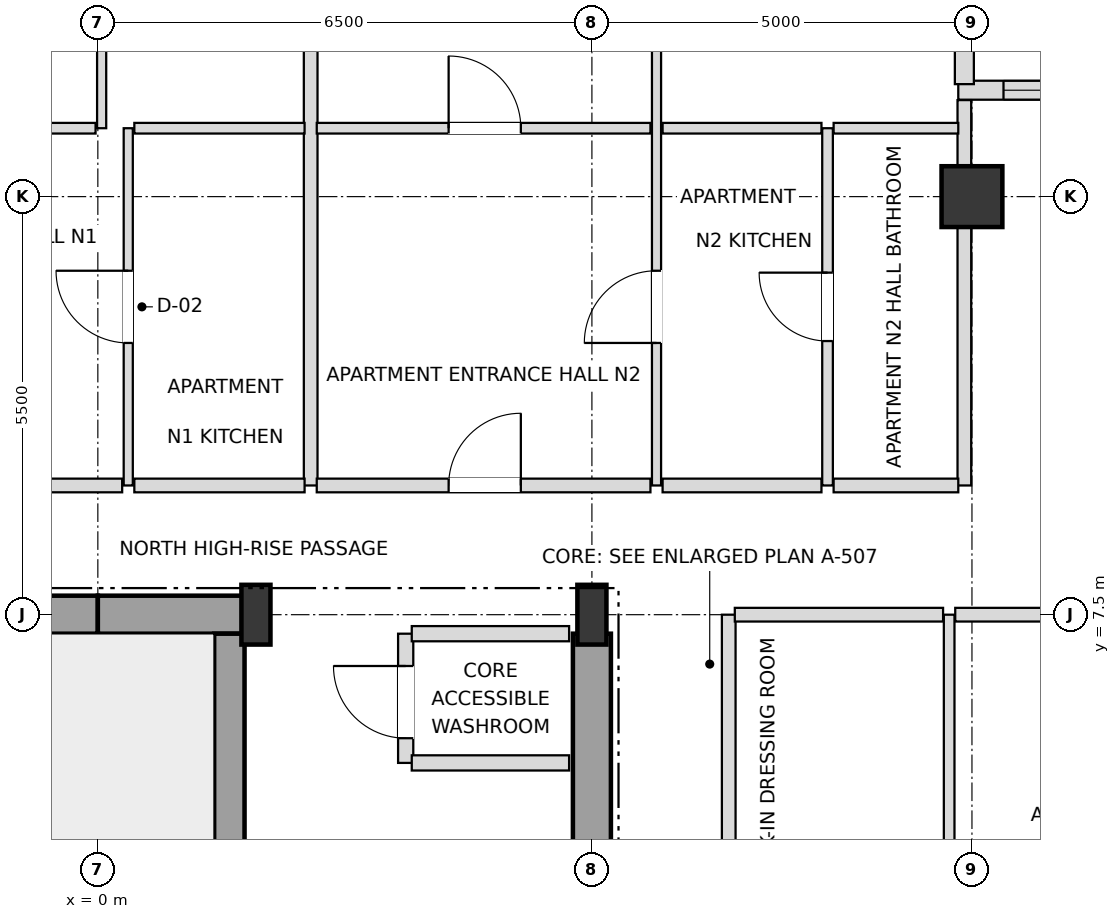
"""IFC4 building model, lengths in metres.
Left out: names, types, materials, properties, quantities, classifications, styles, units other than length and angle.
Written with IfcOpenShell. Run it as: python <this file> out.ifc"""

import sys

from ifc_helpers import new_model, si_unit, direction, frame, frame_2d, origin, origin_2d, place, context, subcontext, project, spatial, rectangle, i_section, extrude, element, fill, save


model = new_model("IFC4")
c1 = context("Model", 3, precision=1e-05, world=origin(), true_north=direction((0.0, 1.0)))
c2 = subcontext(c1, "Body", "Model", "MODEL_VIEW")
j1 = project(units=[si_unit("LENGTHUNIT", "METRE"), si_unit("PLANEANGLEUNIT", "RADIAN")], contexts=[c1])
p1 = place(None, origin())
s1 = spatial("IfcSite", under=j1, at=p1, CompositionType="ELEMENT")
p2 = place(p1, origin())
s2 = spatial("IfcBuilding", under=s1, at=p2, CompositionType="ELEMENT")
p3 = place(p2, frame((0.0, 0.0, 233.1)))
s3 = spatial("IfcBuildingStorey", under=s2, at=p3, CompositionType="ELEMENT", Elevation=233.1)
for number, where, z_axis, x_axis in (
    (1, (2.08, 7.5, 0.0), (0.0, 0.0, 1.0), (1.0, 0.0, 0.0)),
    (2, (6.5, 7.5, 0.0), (0.0, 0.0, 1.0), (1.0, 0.0, 0.0)),
):
    element("IfcColumn", number, at=place(p3, frame(where, z_axis=z_axis, x_axis=x_axis)), inside=s3, PredefinedType="COLUMN", context=c2, shape_type="SweptSolid", body=[
        extrude(i_section(OverallWidth=0.382, OverallDepth=0.786, WebThickness=0.02, FlangeThickness=0.033, at=origin_2d()), origin(), (0.0, 0.0, 1.0), 3.6),
    ])
p4 = place(p3, frame((11.5, 13.0, 0.0), z_axis=(0.0, 0.0, 1.0), x_axis=(1.0, 0.0, 0.0)))
e3 = element("IfcColumn", 3, at=p4, inside=s3, PredefinedType="COLUMN", context=c2, shape_type="SweptSolid", body=[
    extrude(rectangle(XDim=0.8, YDim=0.8, at=origin_2d()), origin(), (0.0, 0.0, 1.0), 3.6),
])
p5 = place(p3, frame((16.98, 14.4, 0.0), z_axis=(0.0, 0.0, 1.0), x_axis=(-1.0, 0.0, 0.0)))
e4 = element("IfcWall", 4, at=p5, inside=s3, PredefinedType="SOLIDWALL", context=c2, shape_type="SweptSolid", body=[
    extrude(rectangle(XDim=5.66, YDim=0.25, at=frame_2d((2.83, 0.0))), origin(), (0.0, 0.0, 1.0), 2.748),
])
p6 = place(p5, frame((0.595, 0.0, 0.72)))
e5 = element("IfcOpeningElement", 5, at=p6, cuts=e4, PredefinedType="OPENING", context=c2, shape_type="SweptSolid", body=[
    extrude(rectangle(XDim=1.8, YDim=1.68, at=frame_2d((0.9, 0.84))), frame((0.0, 0.135, 0.0), z_axis=(0.0, -1.0, 0.0), x_axis=(1.0, 0.0, 0.0)), (0.0, 0.0, 1.0), 0.27),
])
p7 = place(p5, frame((3.265, 0.0, 0.72)))
e6 = element("IfcOpeningElement", 6, at=p7, cuts=e4, PredefinedType="OPENING", context=c2, shape_type="SweptSolid", body=[
    extrude(rectangle(XDim=1.8, YDim=1.68, at=frame_2d((0.9, 0.84))), frame((0.0, 0.135, 0.0), z_axis=(0.0, -1.0, 0.0), x_axis=(1.0, 0.0, 0.0)), (0.0, 0.0, 1.0), 0.27),
])
p8 = place(p3, frame((11.4, 14.48, 0.0), z_axis=(0.0, 0.0, 1.0), x_axis=(0.0, 1.0, 0.0)))
e7 = element("IfcWall", 7, at=p8, inside=s3, PredefinedType="SOLIDWALL", context=c2, shape_type="SweptSolid", body=[
    extrude(rectangle(XDim=5.34, YDim=0.25, at=frame_2d((2.67, 0.0))), origin(), (0.0, 0.0, 1.0), 2.748),
])
p9 = place(p8, frame((1.615, 0.0, 0.72)))
e8 = element("IfcOpeningElement", 8, at=p9, cuts=e7, PredefinedType="OPENING", context=c2, shape_type="SweptSolid", body=[
    extrude(rectangle(XDim=1.8, YDim=1.68, at=frame_2d((0.9, 0.84))), frame((0.0, 0.135, 0.0), z_axis=(0.0, -1.0, 0.0), x_axis=(1.0, 0.0, 0.0)), (0.0, 0.0, 1.0), 0.27),
])
p10 = place(p3, frame((-6.75, 7.5, 0.0), z_axis=(0.0, 0.0, 1.0), x_axis=(1.0, 0.0, 0.0)))
e9 = element("IfcWall", 9, at=p10, inside=s3, PredefinedType="SHEAR", context=c2, shape_type="SweptSolid", body=[
    extrude(rectangle(XDim=6.75, YDim=0.5, at=frame_2d((3.375, 0.0))), origin(), (0.0, 0.0, 1.0), 3.38),
])
p11 = place(p10, frame((1.65, 0.0, 0.0)))
e10 = element("IfcOpeningElement", 10, at=p11, cuts=e9, PredefinedType="OPENING", context=c2, shape_type="SweptSolid", body=[
    extrude(rectangle(XDim=1.05, YDim=2.15, at=frame_2d((0.525, 1.075))), frame((0.0, 0.26, 0.0), z_axis=(0.0, -1.0, 0.0), x_axis=(1.0, 0.0, 0.0)), (0.0, 0.0, 1.0), 0.52),
])
p12 = place(p3, frame((0.0, 7.5, 0.0), z_axis=(0.0, 0.0, 1.0), x_axis=(1.0, 0.0, 0.0)))
e11 = element("IfcWall", 11, at=p12, inside=s3, PredefinedType="SHEAR", context=c2, shape_type="SweptSolid", body=[
    extrude(rectangle(XDim=2.08, YDim=0.5, at=frame_2d((1.04, 0.0))), origin(), (0.0, 0.0, 1.0), 3.38),
])
p13 = place(p3, frame((6.5, 3.95, 0.0), z_axis=(0.0, 0.0, 1.0), x_axis=(0.0, 1.0, 0.0)))
e12 = element("IfcWall", 12, at=p13, inside=s3, PredefinedType="SHEAR", context=c2, shape_type="SweptSolid", body=[
    extrude(rectangle(XDim=3.3, YDim=0.5, at=frame_2d((1.65, 0.0))), origin(), (0.0, 0.0, 1.0), 3.38),
])
p14 = place(p3, frame((1.73, 3.95, 0.0), z_axis=(0.0, 0.0, 1.0), x_axis=(0.0, 1.0, 0.0)))
e13 = element("IfcWall", 13, at=p14, inside=s3, PredefinedType="SHEAR", context=c2, shape_type="SweptSolid", body=[
    extrude(rectangle(XDim=3.3, YDim=0.4, at=frame_2d((1.65, 0.0))), origin(), (0.0, 0.0, 1.0), 3.38),
])
p15 = place(p3, frame((0.05, 13.9, 0.0), z_axis=(0.0, 0.0, 1.0), x_axis=(0.0, 1.0, 0.0)))
e14 = element("IfcWall", 14, at=p15, inside=s3, PredefinedType="PARTITIONING", context=c2, shape_type="SweptSolid", body=[
    extrude(rectangle(XDim=6.0, YDim=0.12, at=frame_2d((3.0, 0.0))), origin(), (0.0, 0.0, 1.0), 3.018),
])
p16 = place(p15, frame((2.55, 0.0, 0.0)))
e15 = element("IfcOpeningElement", 15, at=p16, cuts=e14, PredefinedType="OPENING", context=c2, shape_type="SweptSolid", body=[
    extrude(rectangle(XDim=0.9, YDim=2.1, at=frame_2d((0.45, 1.05))), frame((0.0, 0.07, 0.0), z_axis=(0.0, -1.0, 0.0), x_axis=(1.0, 0.0, 0.0)), (0.0, 0.0, 1.0), 0.14),
])
p17 = place(p3, frame((0.4, 9.2, 0.0), z_axis=(0.0, 0.0, 1.0), x_axis=(0.0, 1.0, 0.0)))
e16 = element("IfcWall", 16, at=p17, inside=s3, PredefinedType="PARTITIONING", context=c2, shape_type="SweptSolid", body=[
    extrude(rectangle(XDim=4.7, YDim=0.12, at=frame_2d((2.35, 0.0))), origin(), (0.0, 0.0, 1.0), 3.38),
])
p18 = place(p17, frame((1.875, 0.0, 0.0)))
e17 = element("IfcOpeningElement", 17, at=p18, cuts=e16, PredefinedType="OPENING", context=c2, shape_type="SweptSolid", body=[
    extrude(rectangle(XDim=0.95, YDim=2.1, at=frame_2d((0.475, 1.05))), frame((0.0, 0.07, 0.0), z_axis=(0.0, -1.0, 0.0), x_axis=(1.0, 0.0, 0.0)), (0.0, 0.0, 1.0), 0.14),
])
p19 = place(p3, frame((2.8, 9.2, 0.0), z_axis=(0.0, 0.0, 1.0), x_axis=(0.0, 1.0, 0.0)))
e18 = element("IfcWall", 18, at=p19, inside=s3, PredefinedType="PARTITIONING", context=c2, shape_type="SweptSolid", body=[
    extrude(rectangle(XDim=10.7, YDim=0.18, at=frame_2d((5.35, 0.0))), origin(), (0.0, 0.0, 1.0), 3.018),
])
p20 = place(p3, frame((4.05, 5.55, 0.0), z_axis=(0.0, 0.0, 1.0), x_axis=(0.0, 1.0, 0.0)))
e19 = element("IfcWall", 19, at=p20, inside=s3, PredefinedType="SOLIDWALL", context=c2, shape_type="SweptSolid", body=[
    extrude(rectangle(XDim=1.7, YDim=0.2, at=frame_2d((0.85, 0.0))), origin(), (0.0, 0.0, 1.0), 3.38),
])
p21 = place(p20, frame((0.325, 0.0, 0.0)))
e20 = element("IfcOpeningElement", 20, at=p21, cuts=e19, PredefinedType="OPENING", context=c2, shape_type="SweptSolid", body=[
    extrude(rectangle(XDim=0.95, YDim=2.15, at=frame_2d((0.475, 1.075))), frame((0.0, 0.11, 0.0), z_axis=(0.0, -1.0, 0.0), x_axis=(1.0, 0.0, 0.0)), (0.0, 0.0, 1.0), 0.22),
])
p22 = place(p3, frame((7.35, 9.2, 0.0), z_axis=(0.0, 0.0, 1.0), x_axis=(0.0, 1.0, 0.0)))
e21 = element("IfcWall", 21, at=p22, inside=s3, PredefinedType="PARTITIONING", context=c2, shape_type="SweptSolid", body=[
    extrude(rectangle(XDim=10.7, YDim=0.12, at=frame_2d((5.35, 0.0))), origin(), (0.0, 0.0, 1.0), 2.826),
])
p23 = place(p22, frame((1.875, 0.0, 0.0)))
e22 = element("IfcOpeningElement", 22, at=p23, cuts=e21, PredefinedType="OPENING", context=c2, shape_type="SweptSolid", body=[
    extrude(rectangle(XDim=0.95, YDim=2.1, at=frame_2d((0.475, 1.05))), frame((0.0, 0.07, 0.0), z_axis=(0.0, -1.0, 0.0), x_axis=(1.0, 0.0, 0.0)), (0.0, 0.0, 1.0), 0.14),
])
p24 = place(p22, frame((7.25, 0.0, 0.0)))
e23 = element("IfcOpeningElement", 23, at=p24, cuts=e21, PredefinedType="OPENING", context=c2, shape_type="SweptSolid", body=[
    extrude(rectangle(XDim=0.9, YDim=2.1, at=frame_2d((0.45, 1.05))), frame((0.0, 0.07, 0.0), z_axis=(0.0, -1.0, 0.0), x_axis=(1.0, 0.0, 0.0)), (0.0, 0.0, 1.0), 0.14),
])
p25 = place(p3, frame((8.3, -7.5, 0.0), z_axis=(0.0, 0.0, 1.0), x_axis=(0.0, 1.0, 0.0)))
e24 = element("IfcWall", 24, at=p25, inside=s3, PredefinedType="PARTITIONING", context=c2, shape_type="SweptSolid", body=[
    extrude(rectangle(XDim=15.0, YDim=0.18, at=frame_2d((7.5, 0.0))), origin(), (0.0, 0.0, 1.0), 3.38),
])
p26 = place(p25, frame((2.355, 0.0, 0.0)))
e25 = element("IfcOpeningElement", 25, at=p26, cuts=e24, PredefinedType="OPENING", context=c2, shape_type="SweptSolid", body=[
    extrude(rectangle(XDim=0.95, YDim=2.15, at=frame_2d((0.475, 1.075))), frame((0.0, 0.1, 0.0), z_axis=(0.0, -1.0, 0.0), x_axis=(1.0, 0.0, 0.0)), (0.0, 0.0, 1.0), 0.2),
])
p27 = place(p3, frame((9.6, 9.2, 0.0), z_axis=(0.0, 0.0, 1.0), x_axis=(0.0, 1.0, 0.0)))
e26 = element("IfcWall", 26, at=p27, inside=s3, PredefinedType="PARTITIONING", context=c2, shape_type="SweptSolid", body=[
    extrude(rectangle(XDim=4.7, YDim=0.14, at=frame_2d((2.35, 0.0))), origin(), (0.0, 0.0, 1.0), 2.826),
])
p28 = place(p27, frame((1.9, 0.0, 0.0)))
e27 = element("IfcOpeningElement", 27, at=p28, cuts=e26, PredefinedType="OPENING", context=c2, shape_type="SweptSolid", body=[
    extrude(rectangle(XDim=0.9, YDim=2.1, at=frame_2d((0.45, 1.05))), frame((0.0, 0.08, 0.0), z_axis=(0.0, -1.0, 0.0), x_axis=(1.0, 0.0, 0.0)), (0.0, 0.0, 1.0), 0.16),
])
p29 = place(p3, frame((11.2, -7.5, 0.0), z_axis=(0.0, 0.0, 1.0), x_axis=(0.0, 1.0, 0.0)))
e28 = element("IfcWall", 28, at=p29, inside=s3, PredefinedType="PARTITIONING", context=c2, shape_type="SweptSolid", body=[
    extrude(rectangle(XDim=15.0, YDim=0.14, at=frame_2d((7.5, 0.0))), origin(), (0.0, 0.0, 1.0), 3.38),
])
p30 = place(p29, frame((3.475, 0.0, 0.0)))
e29 = element("IfcOpeningElement", 29, at=p30, cuts=e28, PredefinedType="OPENING", context=c2, shape_type="SweptSolid", body=[
    extrude(rectangle(XDim=0.95, YDim=2.1, at=frame_2d((0.475, 1.05))), frame((0.0, 0.08, 0.0), z_axis=(0.0, -1.0, 0.0), x_axis=(1.0, 0.0, 0.0)), (0.0, 0.0, 1.0), 0.16),
])
p31 = place(p3, frame((11.4, 9.2, 0.0), z_axis=(0.0, 0.0, 1.0), x_axis=(0.0, 1.0, 0.0)))
e30 = element("IfcWall", 30, at=p31, inside=s3, PredefinedType="PARTITIONING", context=c2, shape_type="SweptSolid", body=[
    extrude(rectangle(XDim=5.07, YDim=0.18, at=frame_2d((2.535, 0.0))), origin(), (0.0, 0.0, 1.0), 2.748),
])
for number, where, z_axis, x_axis in (
    (31, (4.13, 5.55, 0.0), (0.0, 0.0, 1.0), (1.0, 0.0, 0.0)),
    (32, (4.13, 7.25, 0.0), (0.0, 0.0, 1.0), (1.0, 0.0, 0.0)),
):
    element("IfcWall", number, at=place(p3, frame(where, z_axis=z_axis, x_axis=x_axis)), inside=s3, PredefinedType="SOLIDWALL", context=c2, shape_type="SweptSolid", body=[
        extrude(rectangle(XDim=2.07, YDim=0.2, at=frame_2d((1.035, 0.0))), origin(), (0.0, 0.0, 1.0), 3.38),
    ])
p32 = place(p3, frame((8.38, 7.5, 0.0), z_axis=(0.0, 0.0, 1.0), x_axis=(1.0, 0.0, 0.0)))
e33 = element("IfcWall", 33, at=p32, inside=s3, PredefinedType="PARTITIONING", context=c2, shape_type="SweptSolid", body=[
    extrude(rectangle(XDim=2.74, YDim=0.18, at=frame_2d((1.37, 0.0))), origin(), (0.0, 0.0, 1.0), 2.826),
])
p33 = place(p3, frame((11.28, 7.5, 0.0), z_axis=(0.0, 0.0, 1.0), x_axis=(1.0, 0.0, 0.0)))
e34 = element("IfcWall", 34, at=p33, inside=s3, PredefinedType="PARTITIONING", context=c2, shape_type="SweptSolid", body=[
    extrude(rectangle(XDim=5.62, YDim=0.18, at=frame_2d((2.81, 0.0))), origin(), (0.0, 0.0, 1.0), 2.826),
])
p34 = place(p3, frame((-4.62, 9.2, 0.0), z_axis=(0.0, 0.0, 1.0), x_axis=(1.0, 0.0, 0.0)))
e35 = element("IfcWall", 35, at=p34, inside=s3, PredefinedType="PARTITIONING", context=c2, shape_type="SweptSolid", body=[
    extrude(rectangle(XDim=4.94, YDim=0.18, at=frame_2d((2.47, 0.0))), origin(), (0.0, 0.0, 1.0), 3.38),
])
p35 = place(p34, frame((1.995, 0.0, 0.0)))
e36 = element("IfcOpeningElement", 36, at=p35, cuts=e35, PredefinedType="OPENING", context=c2, shape_type="SweptSolid", body=[
    extrude(rectangle(XDim=0.95, YDim=2.15, at=frame_2d((0.475, 1.075))), frame((0.0, 0.1, 0.0), z_axis=(0.0, -1.0, 0.0), x_axis=(1.0, 0.0, 0.0)), (0.0, 0.0, 1.0), 0.2),
])
p36 = place(p3, frame((0.48, 9.2, 0.0), z_axis=(0.0, 0.0, 1.0), x_axis=(1.0, 0.0, 0.0)))
e37 = element("IfcWall", 37, at=p36, inside=s3, PredefinedType="PARTITIONING", context=c2, shape_type="SweptSolid", body=[
    extrude(rectangle(XDim=2.24, YDim=0.18, at=frame_2d((1.12, 0.0))), origin(), (0.0, 0.0, 1.0), 3.38),
])
p37 = place(p3, frame((2.88, 9.2, 0.0), z_axis=(0.0, 0.0, 1.0), x_axis=(1.0, 0.0, 0.0)))
e38 = element("IfcWall", 38, at=p37, inside=s3, PredefinedType="PARTITIONING", context=c2, shape_type="SweptSolid", body=[
    extrude(rectangle(XDim=4.39, YDim=0.18, at=frame_2d((2.195, 0.0))), origin(), (0.0, 0.0, 1.0), 2.826),
])
p38 = place(p37, frame((1.735, 0.0, 0.0)))
e39 = element("IfcOpeningElement", 39, at=p38, cuts=e38, PredefinedType="OPENING", context=c2, shape_type="SweptSolid", body=[
    extrude(rectangle(XDim=0.95, YDim=2.15, at=frame_2d((0.475, 1.075))), frame((0.0, 0.1, 0.0), z_axis=(0.0, -1.0, 0.0), x_axis=(1.0, 0.0, 0.0)), (0.0, 0.0, 1.0), 0.2),
])
p39 = place(p3, frame((7.43, 9.2, 0.0), z_axis=(0.0, 0.0, 1.0), x_axis=(1.0, 0.0, 0.0)))
e40 = element("IfcWall", 40, at=p39, inside=s3, PredefinedType="PARTITIONING", context=c2, shape_type="SweptSolid", body=[
    extrude(rectangle(XDim=2.09, YDim=0.18, at=frame_2d((1.045, 0.0))), origin(), (0.0, 0.0, 1.0), 3.38),
])
p40 = place(p3, frame((9.68, 9.2, 0.0), z_axis=(0.0, 0.0, 1.0), x_axis=(1.0, 0.0, 0.0)))
e41 = element("IfcWall", 41, at=p40, inside=s3, PredefinedType="PARTITIONING", context=c2, shape_type="SweptSolid", body=[
    extrude(rectangle(XDim=1.64, YDim=0.18, at=frame_2d((0.82, 0.0))), origin(), (0.0, 0.0, 1.0), 3.38),
])
p41 = place(p3, frame((-2.67, 13.9, 0.0), z_axis=(0.0, 0.0, 1.0), x_axis=(1.0, 0.0, 0.0)))
e42 = element("IfcWall", 42, at=p41, inside=s3, PredefinedType="PARTITIONING", context=c2, shape_type="SweptSolid", body=[
    extrude(rectangle(XDim=2.64, YDim=0.14, at=frame_2d((1.32, 0.0))), origin(), (0.0, 0.0, 1.0), 3.38),
])
p42 = place(p3, frame((0.48, 13.9, 0.0), z_axis=(0.0, 0.0, 1.0), x_axis=(1.0, 0.0, 0.0)))
e43 = element("IfcWall", 43, at=p42, inside=s3, PredefinedType="PARTITIONING", context=c2, shape_type="SweptSolid", body=[
    extrude(rectangle(XDim=2.24, YDim=0.14, at=frame_2d((1.12, 0.0))), origin(), (0.0, 0.0, 1.0), 3.38),
])
p43 = place(p3, frame((2.88, 13.9, 0.0), z_axis=(0.0, 0.0, 1.0), x_axis=(1.0, 0.0, 0.0)))
e44 = element("IfcWall", 44, at=p43, inside=s3, PredefinedType="PARTITIONING", context=c2, shape_type="SweptSolid", body=[
    extrude(rectangle(XDim=4.39, YDim=0.14, at=frame_2d((2.195, 0.0))), origin(), (0.0, 0.0, 1.0), 2.826),
])
p44 = place(p43, frame((1.735, 0.0, 0.0)))
e45 = element("IfcOpeningElement", 45, at=p44, cuts=e44, PredefinedType="OPENING", context=c2, shape_type="SweptSolid", body=[
    extrude(rectangle(XDim=0.95, YDim=2.1, at=frame_2d((0.475, 1.05))), frame((0.0, 0.08, 0.0), z_axis=(0.0, -1.0, 0.0), x_axis=(1.0, 0.0, 0.0)), (0.0, 0.0, 1.0), 0.16),
])
p45 = place(p3, frame((7.43, 13.9, 0.0), z_axis=(0.0, 0.0, 1.0), x_axis=(1.0, 0.0, 0.0)))
e46 = element("IfcWall", 46, at=p45, inside=s3, PredefinedType="PARTITIONING", context=c2, shape_type="SweptSolid", body=[
    extrude(rectangle(XDim=2.09, YDim=0.14, at=frame_2d((1.045, 0.0))), origin(), (0.0, 0.0, 1.0), 3.38),
])
p46 = place(p3, frame((9.68, 13.9, 0.0), z_axis=(0.0, 0.0, 1.0), x_axis=(1.0, 0.0, 0.0)))
e47 = element("IfcWall", 47, at=p46, inside=s3, PredefinedType="PARTITIONING", context=c2, shape_type="SweptSolid", body=[
    extrude(rectangle(XDim=1.64, YDim=0.14, at=frame_2d((0.82, 0.0))), origin(), (0.0, 0.0, 1.0), 3.38),
])
p47 = place(p7, origin())
e48 = element("IfcWindow", 48, at=p47, inside=s3, PartitioningType="SINGLE_PANEL", PredefinedType="WINDOW", context=c2, shape_type="SweptSolid", body=[
    extrude(rectangle(XDim=1.8, YDim=1.68, at=frame_2d((0.9, 0.84))), frame((0.0, 0.03, 0.0), z_axis=(0.0, -1.0, 0.0), x_axis=(1.0, 0.0, 0.0)), (0.0, 0.0, 1.0), 0.06),
])
fill(e6, e48)
p48 = place(p21, origin())
e49 = element("IfcDoor", 49, at=p48, inside=s3, OperationType="SINGLE_SWING_RIGHT", PredefinedType="DOOR", context=c2, shape_type="SweptSolid", body=[
    extrude(rectangle(XDim=0.95, YDim=2.15, at=frame_2d((0.475, 1.075))), frame((0.0, 0.025, 0.0), z_axis=(0.0, -1.0, 0.0), x_axis=(1.0, 0.0, 0.0)), (0.0, 0.0, 1.0), 0.05),
])
fill(e20, e49)
p49 = place(p18, origin())
e50 = element("IfcDoor", 50, at=p49, inside=s3, OperationType="SINGLE_SWING_RIGHT", PredefinedType="DOOR", context=c2, shape_type="SweptSolid", body=[
    extrude(rectangle(XDim=0.95, YDim=2.1, at=frame_2d((0.475, 1.05))), frame((0.0, 0.025, 0.0), z_axis=(0.0, -1.0, 0.0), x_axis=(1.0, 0.0, 0.0)), (0.0, 0.0, 1.0), 0.05),
])
fill(e17, e50)
p50 = place(p38, origin())
e51 = element("IfcDoor", 51, at=p50, inside=s3, OperationType="SINGLE_SWING_RIGHT", PredefinedType="DOOR", context=c2, shape_type="SweptSolid", body=[
    extrude(rectangle(XDim=0.95, YDim=2.15, at=frame_2d((0.475, 1.075))), frame((0.0, 0.025, 0.0), z_axis=(0.0, -1.0, 0.0), x_axis=(1.0, 0.0, 0.0)), (0.0, 0.0, 1.0), 0.05),
])
fill(e39, e51)
p51 = place(p23, origin())
e52 = element("IfcDoor", 52, at=p51, inside=s3, OperationType="SINGLE_SWING_LEFT", PredefinedType="DOOR", context=c2, shape_type="SweptSolid", body=[
    extrude(rectangle(XDim=0.95, YDim=2.1, at=frame_2d((0.475, 1.05))), frame((0.0, 0.025, 0.0), z_axis=(0.0, -1.0, 0.0), x_axis=(1.0, 0.0, 0.0)), (0.0, 0.0, 1.0), 0.05),
])
fill(e22, e52)
p52 = place(p28, origin())
e53 = element("IfcDoor", 53, at=p52, inside=s3, OperationType="SINGLE_SWING_RIGHT", PredefinedType="DOOR", context=c2, shape_type="SweptSolid", body=[
    extrude(rectangle(XDim=0.9, YDim=2.1, at=frame_2d((0.45, 1.05))), frame((0.0, 0.025, 0.0), z_axis=(0.0, -1.0, 0.0), x_axis=(1.0, 0.0, 0.0)), (0.0, 0.0, 1.0), 0.05),
])
fill(e27, e53)
p53 = place(p44, origin())
e54 = element("IfcDoor", 54, at=p53, inside=s3, OperationType="SINGLE_SWING_LEFT", PredefinedType="DOOR", context=c2, shape_type="SweptSolid", body=[
    extrude(rectangle(XDim=0.95, YDim=2.1, at=frame_2d((0.475, 1.05))), frame((0.0, 0.025, 0.0), z_axis=(0.0, -1.0, 0.0), x_axis=(1.0, 0.0, 0.0)), (0.0, 0.0, 1.0), 0.05),
])
fill(e45, e54)
save(model, sys.argv[1])
